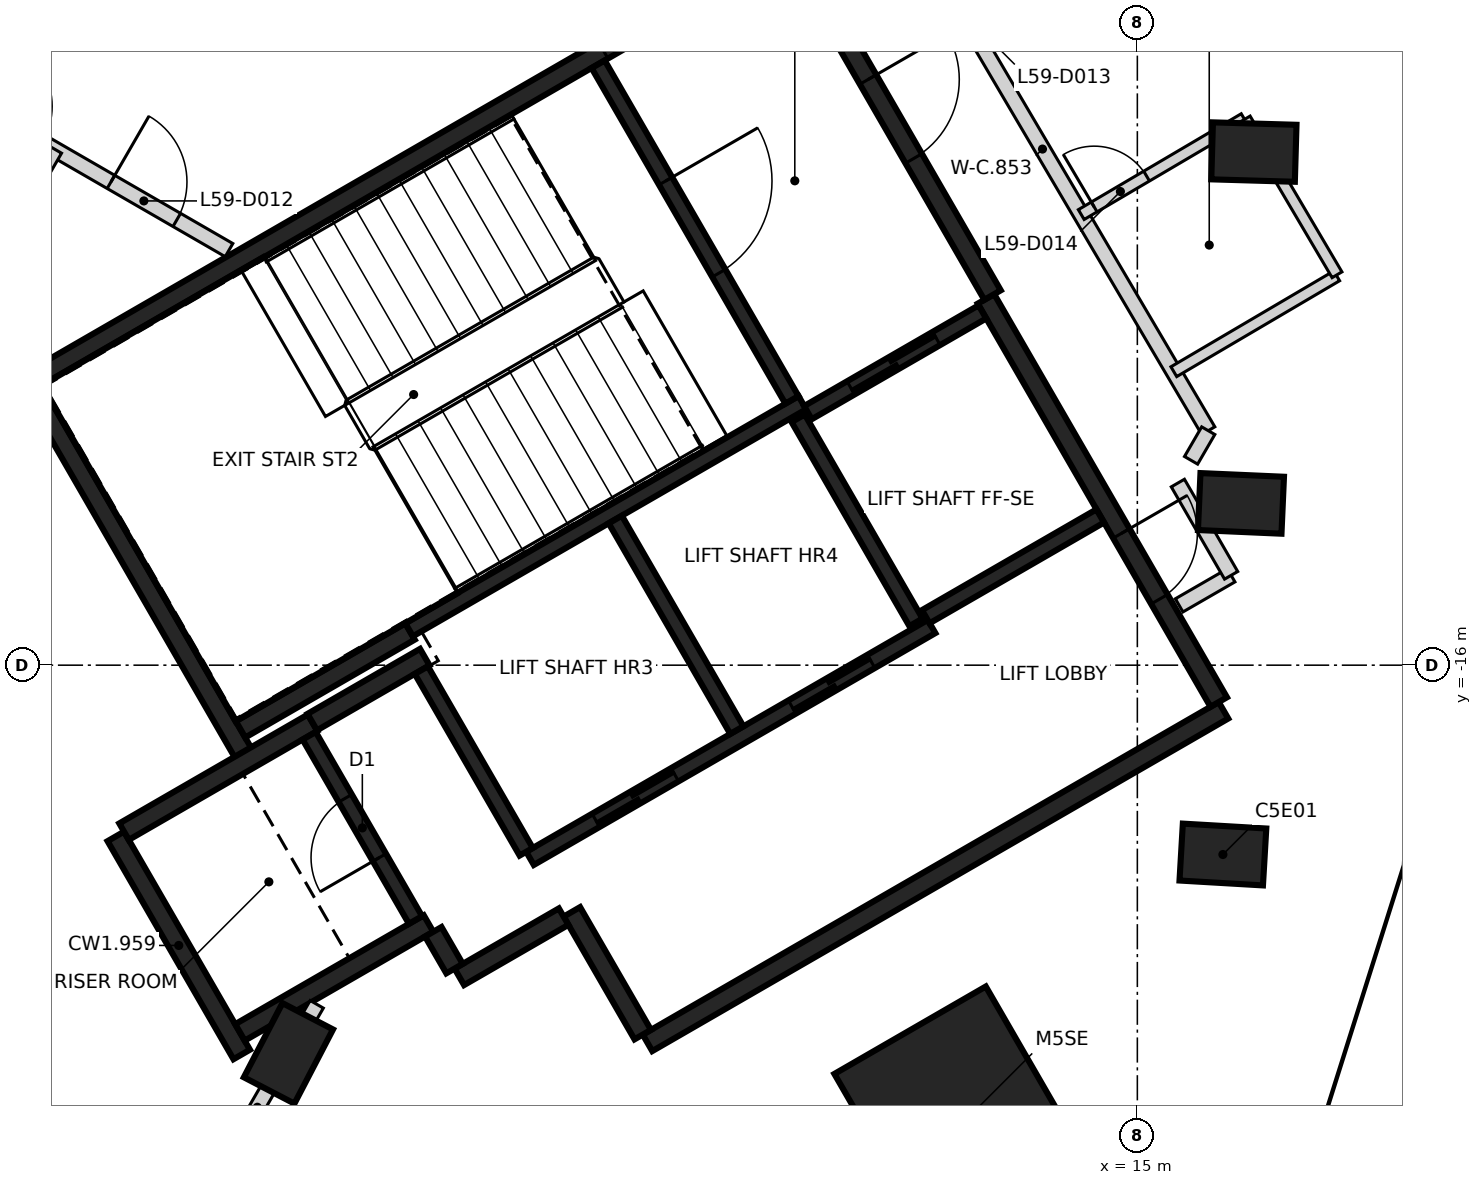
"""IFC4 building model, lengths in metres.
Left out: names, types, materials, properties, quantities, classifications, styles, units other than length and angle.
Written with IfcOpenShell. Run it as: python <this file> out.ifc"""

import sys

from ifc_helpers import new_model, si_unit, direction, frame, frame_2d, origin, origin_2d, place, context, subcontext, project, spatial, rectangle, extrude, element, fill, save


model = new_model("IFC4")
c1 = context("Model", 3, precision=1e-05, world=origin(), true_north=direction((0.0, 1.0)))
c2 = subcontext(c1, "Body", "Model", "MODEL_VIEW")
j1 = project(units=[si_unit("LENGTHUNIT", "METRE"), si_unit("PLANEANGLEUNIT", "RADIAN")], contexts=[c1])
p1 = place(None, origin())
s1 = spatial("IfcSite", under=j1, at=p1, CompositionType="ELEMENT")
p2 = place(p1, origin())
s2 = spatial("IfcBuilding", under=s1, at=p2, CompositionType="ELEMENT")
p3 = place(p2, frame((0.0, 0.0, 235.8)))
s3 = spatial("IfcBuildingStorey", under=s2, at=p3, CompositionType="ELEMENT", Elevation=235.8)
for number, where, z_axis, x_axis in (
    (1, (16.125, -18.491, -0.35), (0.0, 0.0, 1.0), (-0.998, 0.058, 0.0)),
    (2, (16.363, -13.872, -0.35), (0.0, 0.0, 1.0), (-0.999, 0.044, 0.0)),
    (3, (16.533, -9.25, -0.35), (0.0, 0.0, 1.0), (-1.0, 0.029, 0.0)),
    (4, (3.832, -21.107, -0.35), (0.0, 0.0, 1.0), (0.461, 0.887, 0.0)),
):
    element("IfcColumn", number, at=place(p3, frame(where, z_axis=z_axis, x_axis=x_axis)), inside=s3, PredefinedType="COLUMN", context=c2, shape_type="SweptSolid", body=[
        extrude(rectangle(XDim=1.1, YDim=0.75, at=origin_2d()), origin(), (0.0, 0.0, 1.0), 3.6),
    ])
p4 = place(p3, frame((12.71, -22.015, -0.35), z_axis=(0.0, 0.0, 1.0), x_axis=(-0.5, 0.866025403784, 0.0)))
e5 = element("IfcColumn", 5, at=p4, inside=s3, PredefinedType="COLUMN", context=c2, shape_type="SweptSolid", body=[
    extrude(rectangle(XDim=2.8, YDim=2.3, at=origin_2d()), origin(), (0.0, 0.0, 1.0), 3.6),
])
p5 = place(p3, frame((0.417, -12.273, 0.0), z_axis=(0.0, 0.0, 1.0), x_axis=(0.866021906294, 0.500006057782, 0.0)))
e6 = element("IfcWall", 6, at=p5, inside=s3, PredefinedType="SHEAR", context=c2, shape_type="SweptSolid", body=[
    extrude(rectangle(XDim=11.55, YDim=0.25, at=frame_2d((5.775, 0.0))), origin(), (0.0, 0.0, 1.0), 3.25),
])
p6 = place(p5, frame((10.025, 0.0, 0.0)))
e7 = element("IfcOpeningElement", 7, at=p6, cuts=e6, PredefinedType="OPENING", context=c2, shape_type="SweptSolid", body=[
    extrude(rectangle(XDim=1.2, YDim=2.1, at=frame_2d((0.6, 1.05))), frame((0.0, 0.135, 0.0), z_axis=(0.0, -1.0, 0.0), x_axis=(1.0, 0.0, 0.0)), (0.0, 0.0, 1.0), 0.27),
])
p7 = place(p5, frame((8.725, 0.0, 0.0)))
e8 = element("IfcOpeningElement", 8, at=p7, cuts=e6, PredefinedType="OPENING", context=c2, shape_type="SweptSolid", body=[
    extrude(rectangle(XDim=1.2, YDim=2.1, at=frame_2d((0.6, 1.05))), frame((0.0, 0.135, 0.0), z_axis=(0.0, -1.0, 0.0), x_axis=(1.0, 0.0, 0.0)), (0.0, 0.0, 1.0), 0.27),
])
p8 = place(p3, frame((16.133, -16.594, 0.0), z_axis=(0.0, 0.0, 1.0), x_axis=(-0.866022959057, -0.500004234368, 0.0)))
e9 = element("IfcWall", 9, at=p8, inside=s3, PredefinedType="SHEAR", context=c2, shape_type="SweptSolid", body=[
    extrude(rectangle(XDim=8.75, YDim=0.25, at=frame_2d((4.375, 0.0))), origin(), (0.0, 0.0, 1.0), 3.25),
])
p9 = place(p3, frame((13.008, -11.181, 0.0), z_axis=(0.0, 0.0, 1.0), x_axis=(0.500001955336, -0.866024274868, 0.0)))
e10 = element("IfcWall", 10, at=p9, inside=s3, PredefinedType="SHEAR", context=c2, shape_type="SweptSolid", body=[
    extrude(rectangle(XDim=6.125, YDim=0.25, at=frame_2d((3.062, 0.0))), origin(), (0.0, 0.0, 1.0), 3.25),
])
p10 = place(p9, frame((3.563, 0.0, 0.0)))
e11 = element("IfcOpeningElement", 11, at=p10, cuts=e10, PredefinedType="OPENING", context=c2, shape_type="SweptSolid", body=[
    extrude(rectangle(XDim=1.0, YDim=2.1, at=frame_2d((0.5, 1.05))), frame((0.0, 0.135, 0.0), z_axis=(0.0, -1.0, 0.0), x_axis=(1.0, 0.0, 0.0)), (0.0, 0.0, 1.0), 0.27),
])
p11 = place(p3, frame((3.235, -17.153, 0.0), z_axis=(0.0, 0.0, 1.0), x_axis=(-0.500008851346, 0.866020293397, 0.0)))
e12 = element("IfcWall", 12, at=p11, inside=s3, PredefinedType="SHEAR", context=c2, shape_type="SweptSolid", body=[
    extrude(rectangle(XDim=5.51, YDim=0.25, at=frame_2d((2.755, 0.0))), origin(), (0.0, 0.0, 1.0), 3.25),
])
p12 = place(p3, frame((10.483, -6.606, 0.0), z_axis=(0.0, 0.0, 1.0), x_axis=(0.49999885962, -0.866026062182, 0.0)))
e13 = element("IfcWall", 13, at=p12, inside=s3, PredefinedType="SHEAR", context=c2, shape_type="SweptSolid", body=[
    extrude(rectangle(XDim=5.225, YDim=0.25, at=frame_2d((2.612, 0.0))), origin(), (0.0, 0.0, 1.0), 3.25),
])
p13 = place(p12, frame((1.95, 0.0, 0.0)))
e14 = element("IfcOpeningElement", 14, at=p13, cuts=e13, PredefinedType="OPENING", context=c2, shape_type="SweptSolid", body=[
    extrude(rectangle(XDim=1.2, YDim=2.1, at=frame_2d((0.6, 1.05))), frame((0.0, 0.135, 0.0), z_axis=(0.0, -1.0, 0.0), x_axis=(1.0, 0.0, 0.0)), (0.0, 0.0, 1.0), 0.27),
])
p14 = place(p3, frame((3.217, -21.122, 0.0), z_axis=(0.0, 0.0, 1.0), x_axis=(-0.499998874531, 0.866026053573, 0.0)))
e15 = element("IfcWall", 15, at=p14, inside=s3, PredefinedType="SHEAR", context=c2, shape_type="SweptSolid", body=[
    extrude(rectangle(XDim=3.313, YDim=0.25, at=frame_2d((1.656, 0.0))), origin(), (0.0, 0.0, 1.0), 3.25),
])
p15 = place(p3, frame((1.669, -18.19, 0.0), z_axis=(0.0, 0.0, 1.0), x_axis=(0.866042235819, 0.499970844928, 0.0)))
e16 = element("IfcWall", 16, at=p15, inside=s3, PredefinedType="SHEAR", context=c2, shape_type="SweptSolid", body=[
    extrude(rectangle(XDim=2.865, YDim=0.25, at=frame_2d((1.432, 0.0))), origin(), (0.0, 0.0, 1.0), 3.25),
])
p16 = place(p3, frame((5.675, -19.399, 0.0), z_axis=(0.0, 0.0, 1.0), x_axis=(-0.866026637627, -0.499997862916, 0.0)))
e17 = element("IfcWall", 17, at=p16, inside=s3, PredefinedType="SHEAR", context=c2, shape_type="SweptSolid", body=[
    extrude(rectangle(XDim=2.865, YDim=0.25, at=frame_2d((1.432, 0.0))), origin(), (0.0, 0.0, 1.0), 3.25),
])
p17 = place(p3, frame((5.431, -15.556, 0.0), z_axis=(0.0, 0.0, 1.0), x_axis=(-0.866022940537, -0.500004266446, 0.0)))
e18 = element("IfcWall", 18, at=p17, inside=s3, PredefinedType="SHEAR", context=c2, shape_type="SweptSolid", body=[
    extrude(rectangle(XDim=2.575, YDim=0.25, at=frame_2d((1.287, 0.0))), origin(), (0.0, 0.0, 1.0), 3.25),
])
p18 = place(p3, frame((8.493, -20.86, 0.0), z_axis=(0.0, 0.0, 1.0), x_axis=(-0.500039802285, 0.866002422705, 0.0)))
e19 = element("IfcWall", 19, at=p18, inside=s3, PredefinedType="SHEAR", context=c2, shape_type="SweptSolid", body=[
    extrude(rectangle(XDim=1.865, YDim=0.25, at=frame_2d((0.932, 0.0))), origin(), (0.0, 0.0, 1.0), 3.25),
])
p19 = place(p3, frame((4.145, -16.749, 0.0), z_axis=(0.0, 0.0, 1.0), x_axis=(0.866038183914, 0.499977863513, 0.0)))
e20 = element("IfcWall", 20, at=p19, inside=s3, PredefinedType="SHEAR", context=c2, shape_type="SweptSolid", body=[
    extrude(rectangle(XDim=1.71, YDim=0.25, at=frame_2d((0.855, 0.0))), origin(), (0.0, 0.0, 1.0), 3.25),
])
p20 = place(p3, frame((7.452, -19.308, 0.0), z_axis=(0.0, 0.0, 1.0), x_axis=(-0.866044474677, -0.49996696679, 0.0)))
e21 = element("IfcWall", 21, at=p20, inside=s3, PredefinedType="SHEAR", context=c2, shape_type="SweptSolid", body=[
    extrude(rectangle(XDim=1.584, YDim=0.25, at=frame_2d((0.792, 0.0))), origin(), (0.0, 0.0, 1.0), 3.25),
])
p21 = place(p3, frame((6.017, -19.992, 0.0), z_axis=(0.0, 0.0, 1.0), x_axis=(-0.500364886717, 0.865814633822, 0.0)))
e22 = element("IfcWall", 22, at=p21, inside=s3, PredefinedType="SHEAR", context=c2, shape_type="SweptSolid", body=[
    extrude(rectangle(XDim=0.559, YDim=0.25, at=frame_2d((0.28, 0.0))), origin(), (0.0, 0.0, 1.0), 3.25),
])
p22 = place(p3, frame((5.419, -15.534, 0.0), z_axis=(0.0, 0.0, 1.0), x_axis=(0.866029065029, 0.499993658486, 0.0)))
e23 = element("IfcWall", 23, at=p22, inside=s3, PredefinedType="SHEAR", context=c2, shape_type="SweptSolid", body=[
    extrude(rectangle(XDim=5.974, YDim=0.2, at=frame_2d((2.987, 0.0))), origin(), (0.0, 0.0, 1.0), 3.25),
])
p23 = place(p3, frame((7.01, -18.542, 0.0), z_axis=(0.0, 0.0, 1.0), x_axis=(0.866030299012, 0.499991521122, 0.0)))
e24 = element("IfcWall", 24, at=p23, inside=s3, PredefinedType="SHEAR", context=c2, shape_type="SweptSolid", body=[
    extrude(rectangle(XDim=6.1, YDim=0.2, at=frame_2d((3.05, 0.0))), origin(), (0.0, 0.0, 1.0), 3.25),
])
p24 = place(p23, frame((1.0, 0.0, 0.0)))
e25 = element("IfcOpeningElement", 25, at=p24, cuts=e24, PredefinedType="OPENING", context=c2, shape_type="SweptSolid", body=[
    extrude(rectangle(XDim=1.2, YDim=2.1, at=frame_2d((0.6, 1.05))), frame((0.0, 0.11, 0.0), z_axis=(0.0, -1.0, 0.0), x_axis=(1.0, 0.0, 0.0)), (0.0, 0.0, 1.0), 0.22),
])
p25 = place(p23, frame((3.982, 0.0, 0.0)))
e26 = element("IfcOpeningElement", 26, at=p25, cuts=e24, PredefinedType="OPENING", context=c2, shape_type="SweptSolid", body=[
    extrude(rectangle(XDim=1.2, YDim=2.1, at=frame_2d((0.6, 1.05))), frame((0.0, 0.11, 0.0), z_axis=(0.0, -1.0, 0.0), x_axis=(1.0, 0.0, 0.0)), (0.0, 0.0, 1.0), 0.22),
])
p26 = place(p3, frame((7.906, -8.094, 0.0), z_axis=(0.0, 0.0, 1.0), x_axis=(0.500027839223, -0.866009330205, 0.0)))
e27 = element("IfcWall", 27, at=p26, inside=s3, PredefinedType="SHEAR", context=c2, shape_type="SweptSolid", body=[
    extrude(rectangle(XDim=5.098, YDim=0.2, at=frame_2d((2.549, 0.0))), origin(), (0.0, 0.0, 1.0), 3.25),
])
p27 = place(p26, frame((1.774, 0.0, 0.0)))
e28 = element("IfcOpeningElement", 28, at=p27, cuts=e27, PredefinedType="OPENING", context=c2, shape_type="SweptSolid", body=[
    extrude(rectangle(XDim=1.4, YDim=2.1, at=frame_2d((0.7, 1.05))), frame((0.0, 0.11, 0.0), z_axis=(0.0, -1.0, 0.0), x_axis=(1.0, 0.0, 0.0)), (0.0, 0.0, 1.0), 0.22),
])
p28 = place(p3, frame((8.132, -14.084, 0.0), z_axis=(0.0, 0.0, 1.0), x_axis=(0.499997778408, -0.866026686418, 0.0)))
e29 = element("IfcWall", 29, at=p28, inside=s3, PredefinedType="SHEAR", context=c2, shape_type="SweptSolid", body=[
    extrude(rectangle(XDim=3.198, YDim=0.2, at=frame_2d((1.599, 0.0))), origin(), (0.0, 0.0, 1.0), 3.25),
])
p29 = place(p3, frame((5.503, -19.352, 0.0), z_axis=(0.0, 0.0, 1.0), x_axis=(-0.499986818241, 0.866033014143, 0.0)))
e30 = element("IfcWall", 30, at=p29, inside=s3, PredefinedType="SHEAR", context=c2, shape_type="SweptSolid", body=[
    extrude(rectangle(XDim=2.798, YDim=0.2, at=frame_2d((1.399, 0.0))), origin(), (0.0, 0.0, 1.0), 3.25),
])
p30 = place(p29, frame((0.949, 0.0, 0.0)))
e31 = element("IfcOpeningElement", 31, at=p30, cuts=e30, PredefinedType="OPENING", context=c2, shape_type="SweptSolid", body=[
    extrude(rectangle(XDim=0.9, YDim=2.1, at=frame_2d((0.45, 1.05))), frame((0.0, 0.11, 0.0), z_axis=(0.0, -1.0, 0.0), x_axis=(1.0, 0.0, 0.0)), (0.0, 0.0, 1.0), 0.22),
])
p31 = place(p3, frame((6.96, -18.455, 0.0), z_axis=(0.0, 0.0, 1.0), x_axis=(-0.499926705758, 0.866067716099, 0.0)))
e32 = element("IfcWall", 32, at=p31, inside=s3, PredefinedType="SHEAR", context=c2, shape_type="SweptSolid", body=[
    extrude(rectangle(XDim=2.759, YDim=0.2, at=frame_2d((1.38, 0.0))), origin(), (0.0, 0.0, 1.0), 3.25),
])
p32 = place(p3, frame((12.088, -15.437, 0.0), z_axis=(0.0, 0.0, 1.0), x_axis=(-0.500026960575, 0.86600983753, 0.0)))
e33 = element("IfcWall", 33, at=p32, inside=s3, PredefinedType="SHEAR", context=c2, shape_type="SweptSolid", body=[
    extrude(rectangle(XDim=3.1, YDim=0.2, at=frame_2d((1.55, 0.0))), origin(), (0.0, 0.0, 1.0), 3.25),
])
p33 = place(p3, frame((10.666, -12.678, 0.0), z_axis=(0.0, 0.0, 1.0), x_axis=(0.866018407898, 0.500012117035, 0.0)))
e34 = element("IfcWall", 34, at=p33, inside=s3, PredefinedType="SHEAR", context=c2, shape_type="SweptSolid", body=[
    extrude(rectangle(XDim=2.651, YDim=0.2, at=frame_2d((1.325, 0.0))), origin(), (0.0, 0.0, 1.0), 3.25),
])
p34 = place(p33, frame((0.652, 0.0, 0.0)))
e35 = element("IfcOpeningElement", 35, at=p34, cuts=e34, PredefinedType="OPENING", context=c2, shape_type="SweptSolid", body=[
    extrude(rectangle(XDim=1.3, YDim=2.1, at=frame_2d((0.65, 1.05))), frame((0.0, 0.11, 0.0), z_axis=(0.0, -1.0, 0.0), x_axis=(1.0, 0.0, 0.0)), (0.0, 0.0, 1.0), 0.22),
])
p35 = place(p3, frame((14.512, -14.037, 0.0), z_axis=(0.0, 0.0, 1.0), x_axis=(-0.866018407898, -0.500012117035, 0.0)))
e36 = element("IfcWall", 36, at=p35, inside=s3, PredefinedType="SHEAR", context=c2, shape_type="SweptSolid", body=[
    extrude(rectangle(XDim=2.651, YDim=0.2, at=frame_2d((1.325, 0.0))), origin(), (0.0, 0.0, 1.0), 3.25),
])
p36 = place(p3, frame((-8.153, -4.069, 0.0), z_axis=(0.0, 0.0, 1.0), x_axis=(0.865955522833, -0.500121017829, 0.0)))
e37 = element("IfcWall", 37, at=p36, inside=s3, PredefinedType="PARTITIONING", context=c2, shape_type="SweptSolid", body=[
    extrude(rectangle(XDim=12.937, YDim=0.2, at=frame_2d((6.469, 0.0))), origin(), (0.0, 0.0, 1.0), 3.25),
])
p37 = place(p36, frame((3.337, 0.0, 0.0)))
e38 = element("IfcOpeningElement", 38, at=p37, cuts=e37, PredefinedType="OPENING", context=c2, shape_type="SweptSolid", body=[
    extrude(rectangle(XDim=1.0, YDim=2.1, at=frame_2d((0.5, 1.05))), frame((0.0, 0.11, 0.0), z_axis=(0.0, -1.0, 0.0), x_axis=(1.0, 0.0, 0.0)), (0.0, 0.0, 1.0), 0.22),
])
p38 = place(p36, frame((9.153, 0.0, 0.0)))
e39 = element("IfcOpeningElement", 39, at=p38, cuts=e37, PredefinedType="OPENING", context=c2, shape_type="SweptSolid", body=[
    extrude(rectangle(XDim=0.95, YDim=2.1, at=frame_2d((0.475, 1.05))), frame((0.0, 0.11, 0.0), z_axis=(0.0, -1.0, 0.0), x_axis=(1.0, 0.0, 0.0)), (0.0, 0.0, 1.0), 0.22),
])
p39 = place(p36, frame((11.144, 0.0, 0.0)))
e40 = element("IfcOpeningElement", 40, at=p39, cuts=e37, PredefinedType="OPENING", context=c2, shape_type="SweptSolid", body=[
    extrude(rectangle(XDim=1.0, YDim=2.1, at=frame_2d((0.5, 1.05))), frame((0.0, 0.11, 0.0), z_axis=(0.0, -1.0, 0.0), x_axis=(1.0, 0.0, 0.0)), (0.0, 0.0, 1.0), 0.22),
])
p40 = place(p3, frame((11.571, -5.505, 0.0), z_axis=(0.0, 0.0, 1.0), x_axis=(0.507291838928, -0.861774326699, 0.0)))
e41 = element("IfcWall", 41, at=p40, inside=s3, PredefinedType="PARTITIONING", context=c2, shape_type="SweptSolid", body=[
    extrude(rectangle(XDim=8.599, YDim=0.2, at=frame_2d((4.299, 0.0))), origin(), (0.0, 0.0, 1.0), 3.25),
])
p41 = place(p40, frame((1.712, 0.0, 0.0)))
e42 = element("IfcOpeningElement", 42, at=p41, cuts=e41, PredefinedType="OPENING", context=c2, shape_type="SweptSolid", body=[
    extrude(rectangle(XDim=0.95, YDim=2.1, at=frame_2d((0.475, 1.05))), frame((0.0, 0.11, 0.0), z_axis=(0.0, -1.0, 0.0), x_axis=(1.0, 0.0, 0.0)), (0.0, 0.0, 1.0), 0.22),
])
p42 = place(p3, frame((15.55, -15.213, 0.0), z_axis=(0.0, 0.0, 1.0), x_axis=(0.865989998118, 0.500061319399, 0.0)))
e43 = element("IfcWall", 43, at=p42, inside=s3, PredefinedType="PARTITIONING", context=c2, shape_type="SweptSolid", body=[
    extrude(rectangle(XDim=0.79, YDim=0.2, at=frame_2d((0.395, 0.0))), origin(), (0.0, 0.0, 1.0), 2.35),
])
p43 = place(p3, frame((15.933, -12.915, 0.0), z_axis=(0.0, 0.0, 1.0), x_axis=(-0.502017930819, -0.864857211993, 0.0)))
e44 = element("IfcWall", 44, at=p43, inside=s3, PredefinedType="PARTITIONING", context=c2, shape_type="SweptSolid", body=[
    extrude(rectangle(XDim=0.451, YDim=0.2, at=frame_2d((0.226, 0.0))), origin(), (0.0, 0.0, 1.0), 3.25),
])
p44 = place(p3, frame((15.533, -13.604, 0.0), z_axis=(0.0, 0.0, 1.0), x_axis=(0.499978724804, -0.866037686676, 0.0)))
e45 = element("IfcWall", 45, at=p44, inside=s3, PredefinedType="PARTITIONING", context=c2, shape_type="SweptSolid", body=[
    extrude(rectangle(XDim=1.402, YDim=0.2, at=frame_2d((0.701, 0.0))), origin(), (0.0, 0.0, 1.0), 2.35),
])
p45 = place(p3, frame((-4.942, -19.089, 0.0), z_axis=(0.0, 0.0, 1.0), x_axis=(0.500021458202, 0.866013014531, 0.0)))
e46 = element("IfcWall", 46, at=p45, inside=s3, PredefinedType="PARTITIONING", context=c2, shape_type="SweptSolid", body=[
    extrude(rectangle(XDim=11.403, YDim=0.2, at=frame_2d((5.701, 0.0))), origin(), (0.0, 0.0, 1.0), 2.35),
])
p46 = place(p3, frame((2.64, -23.17, 0.0), z_axis=(0.0, 0.0, 1.0), x_axis=(0.500017489778, 0.866015305821, 0.0)))
e47 = element("IfcWall", 47, at=p46, inside=s3, PredefinedType="PARTITIONING", context=c2, shape_type="SweptSolid", body=[
    extrude(rectangle(XDim=3.128, YDim=0.2, at=frame_2d((1.564, 0.0))), origin(), (0.0, 0.0, 1.0), 3.25),
])
p47 = place(p3, frame((14.262, -10.072, 0.0), z_axis=(0.0, 0.0, 1.0), x_axis=(0.861699433364, 0.507419044322, 0.0)))
e48 = element("IfcWall", 48, at=p47, inside=s3, PredefinedType="PARTITIONING", context=c2, shape_type="SweptSolid", body=[
    extrude(rectangle(XDim=2.487, YDim=0.15, at=frame_2d((1.244, 0.0))), origin(), (0.0, 0.0, 1.0), 3.25),
])
p48 = place(p47, frame((0.198, 0.0, 0.0)))
e49 = element("IfcOpeningElement", 49, at=p48, cuts=e48, PredefinedType="OPENING", context=c2, shape_type="SweptSolid", body=[
    extrude(rectangle(XDim=0.8, YDim=2.1, at=frame_2d((0.4, 1.05))), frame((0.0, 0.085, 0.0), z_axis=(0.0, -1.0, 0.0), x_axis=(1.0, 0.0, 0.0)), (0.0, 0.0, 1.0), 0.17),
])
p49 = place(p3, frame((15.48, -12.139, 0.0), z_axis=(0.0, 0.0, 1.0), x_axis=(0.86187110735, 0.507127394562, 0.0)))
e50 = element("IfcWall", 50, at=p49, inside=s3, PredefinedType="PARTITIONING", context=c2, shape_type="SweptSolid", body=[
    extrude(rectangle(XDim=2.487, YDim=0.15, at=frame_2d((1.243, 0.0))), origin(), (0.0, 0.0, 1.0), 2.35),
])
p50 = place(p3, frame((16.419, -8.814, 0.0), z_axis=(0.0, 0.0, 1.0), x_axis=(0.507674628474, -0.861548879405, 0.0)))
e51 = element("IfcWall", 51, at=p50, inside=s3, PredefinedType="PARTITIONING", context=c2, shape_type="SweptSolid", body=[
    extrude(rectangle(XDim=2.379, YDim=0.15, at=frame_2d((1.19, 0.0))), origin(), (0.0, 0.0, 1.0), 3.25),
])
p51 = place(p34, origin())
e52 = element("IfcDoor", 52, at=p51, inside=s3, OperationType="SLIDING_TO_RIGHT", PredefinedType="DOOR", context=c2, shape_type="SweptSolid", body=[
    extrude(rectangle(XDim=1.3, YDim=2.1, at=frame_2d((0.65, 1.05))), frame((0.0, 0.025, 0.0), z_axis=(0.0, -1.0, 0.0), x_axis=(1.0, 0.0, 0.0)), (0.0, 0.0, 1.0), 0.05),
])
fill(e35, e52)
p52 = place(p24, origin())
e53 = element("IfcDoor", 53, at=p52, inside=s3, OperationType="DOUBLE_DOOR_SLIDING", PredefinedType="DOOR", context=c2, shape_type="SweptSolid", body=[
    extrude(rectangle(XDim=1.2, YDim=2.1, at=frame_2d((0.6, 1.05))), frame((0.0, 0.025, 0.0), z_axis=(0.0, -1.0, 0.0), x_axis=(1.0, 0.0, 0.0)), (0.0, 0.0, 1.0), 0.05),
])
fill(e25, e53)
p53 = place(p25, origin())
e54 = element("IfcDoor", 54, at=p53, inside=s3, OperationType="DOUBLE_DOOR_SLIDING", PredefinedType="DOOR", context=c2, shape_type="SweptSolid", body=[
    extrude(rectangle(XDim=1.2, YDim=2.1, at=frame_2d((0.6, 1.05))), frame((0.0, 0.025, 0.0), z_axis=(0.0, -1.0, 0.0), x_axis=(1.0, 0.0, 0.0)), (0.0, 0.0, 1.0), 0.05),
])
fill(e26, e54)
p54 = place(p10, origin())
e55 = element("IfcDoor", 55, at=p54, inside=s3, OperationType="SINGLE_SWING_LEFT", PredefinedType="DOOR", context=c2, shape_type="SweptSolid", body=[
    extrude(rectangle(XDim=1.0, YDim=2.1, at=frame_2d((0.5, 1.05))), frame((0.0, 0.025, 0.0), z_axis=(0.0, -1.0, 0.0), x_axis=(1.0, 0.0, 0.0)), (0.0, 0.0, 1.0), 0.05),
])
fill(e11, e55)
p55 = place(p27, origin())
e56 = element("IfcDoor", 56, at=p55, inside=s3, OperationType="SINGLE_SWING_RIGHT", PredefinedType="DOOR", context=c2, shape_type="SweptSolid", body=[
    extrude(rectangle(XDim=1.4, YDim=2.1, at=frame_2d((0.7, 1.05))), frame((0.0, 0.025, 0.0), z_axis=(0.0, -1.0, 0.0), x_axis=(1.0, 0.0, 0.0)), (0.0, 0.0, 1.0), 0.05),
])
fill(e28, e56)
p56 = place(p30, origin())
e57 = element("IfcDoor", 57, at=p56, inside=s3, OperationType="SINGLE_SWING_LEFT", PredefinedType="DOOR", context=c2, shape_type="SweptSolid", body=[
    extrude(rectangle(XDim=0.9, YDim=2.1, at=frame_2d((0.45, 1.05))), frame((0.0, 0.025, 0.0), z_axis=(0.0, -1.0, 0.0), x_axis=(1.0, 0.0, 0.0)), (0.0, 0.0, 1.0), 0.05),
])
fill(e31, e57)
p57 = place(p13, origin())
e58 = element("IfcDoor", 58, at=p57, inside=s3, OperationType="SINGLE_SWING_LEFT", PredefinedType="DOOR", context=c2, shape_type="SweptSolid", body=[
    extrude(rectangle(XDim=1.2, YDim=2.1, at=frame_2d((0.6, 1.05))), frame((0.0, 0.025, 0.0), z_axis=(0.0, -1.0, 0.0), x_axis=(1.0, 0.0, 0.0)), (0.0, 0.0, 1.0), 0.05),
])
fill(e14, e58)
p58 = place(p39, frame((1.0, 0.0, 0.0), z_axis=(0.0, 0.0, 1.0), x_axis=(-1.0, 0.0, 0.0)))
e59 = element("IfcDoor", 59, at=p58, inside=s3, OperationType="SINGLE_SWING_LEFT", PredefinedType="DOOR", context=c2, shape_type="SweptSolid", body=[
    extrude(rectangle(XDim=1.0, YDim=2.1, at=frame_2d((0.5, 1.05))), frame((0.0, 0.025, 0.0), z_axis=(0.0, -1.0, 0.0), x_axis=(1.0, 0.0, 0.0)), (0.0, 0.0, 1.0), 0.05),
])
fill(e40, e59)
p59 = place(p48, frame((0.8, 0.0, 0.0), z_axis=(0.0, 0.0, 1.0), x_axis=(-1.0, 0.0, 0.0)))
e60 = element("IfcDoor", 60, at=p59, inside=s3, OperationType="SINGLE_SWING_LEFT", PredefinedType="DOOR", context=c2, shape_type="SweptSolid", body=[
    extrude(rectangle(XDim=0.8, YDim=2.1, at=frame_2d((0.4, 1.05))), frame((0.0, 0.025, 0.0), z_axis=(0.0, -1.0, 0.0), x_axis=(1.0, 0.0, 0.0)), (0.0, 0.0, 1.0), 0.05),
])
fill(e49, e60)
save(model, sys.argv[1])
